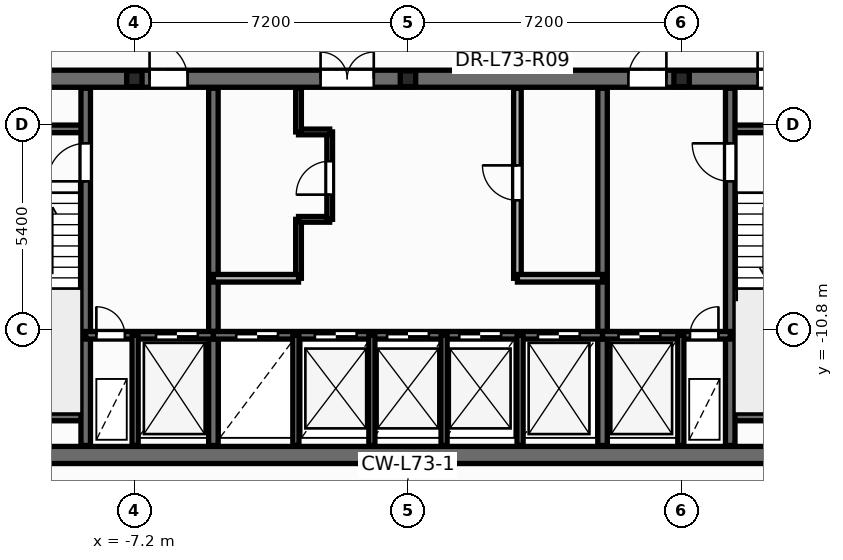
"""IFC4 building model, lengths in metres.
Left out: names, types, materials, properties, quantities, classifications, styles, units other than length and angle.
Written with IfcOpenShell. Run it as: python <this file> out.ifc"""

import sys

from ifc_helpers import new_model, si_unit, direction, frame, frame_2d, origin, origin_2d, place, context, subcontext, project, spatial, rectangle, i_section, extrude, element, fill, save


model = new_model("IFC4")
c1 = context("Model", 3, precision=1e-05, world=origin(), true_north=direction((0.0, 1.0)))
c2 = subcontext(c1, "Body", "Model", "MODEL_VIEW")
j1 = project(units=[si_unit("LENGTHUNIT", "METRE"), si_unit("PLANEANGLEUNIT", "RADIAN")], contexts=[c1])
p1 = place(None, origin())
s1 = spatial("IfcSite", under=j1, at=p1, CompositionType="ELEMENT")
p2 = place(p1, origin())
s2 = spatial("IfcBuilding", under=s1, at=p2, CompositionType="ELEMENT")
p3 = place(p2, frame((0.0, 0.0, 277.8)))
s3 = spatial("IfcBuildingStorey", under=s2, at=p3, CompositionType="ELEMENT", Elevation=277.8)
for number, where, z_axis, x_axis in (
    (1, (-7.2, -4.2, 0.0), (0.0, 0.0, 1.0), (1.0, 0.0, 0.0)),
    (2, (0.0, -4.2, 0.0), (0.0, 0.0, 1.0), (1.0, 0.0, 0.0)),
    (3, (7.2, -4.2, 0.0), (0.0, 0.0, 1.0), (1.0, 0.0, 0.0)),
):
    element("IfcColumn", number, at=place(p3, frame(where, z_axis=z_axis, x_axis=x_axis)), inside=s3, PredefinedType="PILASTER", context=c2, shape_type="SweptSolid", body=[
        extrude(i_section(OverallWidth=0.405, OverallDepth=0.414, WebThickness=0.022, FlangeThickness=0.032, at=origin_2d()), origin(), (0.0, 0.0, 1.0), 3.6),
    ])
p4 = place(p3, frame((-2.88, -9.45, 0.0), z_axis=(0.0, 0.0, 1.0), x_axis=(0.0, 1.0, 0.0)))
e4 = element("IfcWall", 4, at=p4, inside=s3, PredefinedType="PARTITIONING", context=c2, shape_type="SweptSolid", body=[
    extrude(rectangle(XDim=1.55, YDim=0.15, at=frame_2d((0.775, 0.0))), origin(), (0.0, 0.0, 1.0), 3.345),
])
p5 = place(p3, frame((-2.88, -7.9, 0.0), z_axis=(0.0, 0.0, 1.0), x_axis=(1.0, 0.0, 0.0)))
e5 = element("IfcWall", 5, at=p5, inside=s3, PredefinedType="PARTITIONING", context=c2, shape_type="SweptSolid", body=[
    extrude(rectangle(XDim=0.82, YDim=0.15, at=frame_2d((0.41, 0.0))), origin(), (0.0, 0.0, 1.0), 3.345),
])
p6 = place(p3, frame((-2.06, -7.9, 0.0), z_axis=(0.0, 0.0, 1.0), x_axis=(0.0, 1.0, 0.0)))
e6 = element("IfcWall", 6, at=p6, inside=s3, PredefinedType="PARTITIONING", context=c2, shape_type="SweptSolid", body=[
    extrude(rectangle(XDim=2.3, YDim=0.15, at=frame_2d((1.15, 0.0))), origin(), (0.0, 0.0, 1.0), 3.345),
])
p7 = place(p6, frame((0.65, 0.0, 0.0)))
e7 = element("IfcOpeningElement", 7, at=p7, cuts=e6, PredefinedType="OPENING", context=c2, shape_type="SweptSolid", body=[
    extrude(rectangle(XDim=0.886, YDim=2.104, at=frame_2d((0.44, 1.052))), frame((0.0, 0.085, 0.0), z_axis=(0.0, -1.0, 0.0), x_axis=(1.0, 0.0, 0.0)), (0.0, 0.0, 1.0), 0.17),
])
p8 = place(p3, frame((-2.88, -5.6, 0.0), z_axis=(0.0, 0.0, 1.0), x_axis=(1.0, 0.0, 0.0)))
e8 = element("IfcWall", 8, at=p8, inside=s3, PredefinedType="PARTITIONING", context=c2, shape_type="SweptSolid", body=[
    extrude(rectangle(XDim=0.82, YDim=0.15, at=frame_2d((0.41, 0.0))), origin(), (0.0, 0.0, 1.0), 3.345),
])
p9 = place(p3, frame((-2.88, -5.6, 0.0), z_axis=(0.0, 0.0, 1.0), x_axis=(0.0, 1.0, 0.0)))
e9 = element("IfcWall", 9, at=p9, inside=s3, PredefinedType="PARTITIONING", context=c2, shape_type="SweptSolid", body=[
    extrude(rectangle(XDim=1.15, YDim=0.15, at=frame_2d((0.575, 0.0))), origin(), (0.0, 0.0, 1.0), 3.345),
])
p10 = place(p3, frame((-12.65, -14.1, 0.0), z_axis=(0.0, 0.0, 1.0), x_axis=(1.0, 0.0, 0.0)))
e10 = element("IfcWall", 10, at=p10, inside=s3, PredefinedType="SHEAR", context=c2, shape_type="SweptSolid", body=[
    extrude(rectangle(XDim=25.3, YDim=0.45, at=frame_2d((12.65, 0.0))), origin(), (0.0, 0.0, 1.0), 3.6),
])
p11 = place(p3, frame((-12.65, -4.2, 0.0), z_axis=(0.0, 0.0, 1.0), x_axis=(1.0, 0.0, 0.0)))
e11 = element("IfcWall", 11, at=p11, inside=s3, PredefinedType="SHEAR", context=c2, shape_type="SweptSolid", body=[
    extrude(rectangle(XDim=25.3, YDim=0.45, at=frame_2d((12.65, 0.0))), origin(), (0.0, 0.0, 1.0), 3.6),
])
p12 = place(p11, frame((1.85, 0.0, 0.0)))
e12 = element("IfcOpeningElement", 12, at=p12, cuts=e11, PredefinedType="OPENING", context=c2, shape_type="SweptSolid", body=[
    extrude(rectangle(XDim=0.756, YDim=2.054, at=frame_2d((0.375, 1.027))), frame((0.0, 0.235, 0.0), z_axis=(0.0, -1.0, 0.0), x_axis=(1.0, 0.0, 0.0)), (0.0, 0.0, 1.0), 0.47),
])
p13 = place(p11, frame((21.85, 0.0, 0.0)))
e13 = element("IfcOpeningElement", 13, at=p13, cuts=e11, PredefinedType="OPENING", context=c2, shape_type="SweptSolid", body=[
    extrude(rectangle(XDim=0.756, YDim=2.054, at=frame_2d((0.375, 1.027))), frame((0.0, 0.235, 0.0), z_axis=(0.0, -1.0, 0.0), x_axis=(1.0, 0.0, 0.0)), (0.0, 0.0, 1.0), 0.47),
])
p14 = place(p11, frame((23.5, 0.0, 0.0)))
e14 = element("IfcOpeningElement", 14, at=p14, cuts=e11, PredefinedType="OPENING", context=c2, shape_type="SweptSolid", body=[
    extrude(rectangle(XDim=0.756, YDim=2.054, at=frame_2d((0.375, 1.027))), frame((0.0, 0.235, 0.0), z_axis=(0.0, -1.0, 0.0), x_axis=(1.0, 0.0, 0.0)), (0.0, 0.0, 1.0), 0.47),
])
p15 = place(p11, frame((5.85, 0.0, 0.0)))
e15 = element("IfcOpeningElement", 15, at=p15, cuts=e11, PredefinedType="OPENING", context=c2, shape_type="SweptSolid", body=[
    extrude(rectangle(XDim=1.006, YDim=2.104, at=frame_2d((0.5, 1.052))), frame((0.0, 0.235, 0.0), z_axis=(0.0, -1.0, 0.0), x_axis=(1.0, 0.0, 0.0)), (0.0, 0.0, 1.0), 0.47),
])
p16 = place(p11, frame((10.35, 0.0, 0.0)))
e16 = element("IfcOpeningElement", 16, at=p16, cuts=e11, PredefinedType="OPENING", context=c2, shape_type="SweptSolid", body=[
    extrude(rectangle(XDim=1.406, YDim=2.154, at=frame_2d((0.7, 1.077))), frame((0.0, 0.235, 0.0), z_axis=(0.0, -1.0, 0.0), x_axis=(1.0, 0.0, 0.0)), (0.0, 0.0, 1.0), 0.47),
])
p17 = place(p11, frame((18.45, 0.0, 0.0)))
e17 = element("IfcOpeningElement", 17, at=p17, cuts=e11, PredefinedType="OPENING", context=c2, shape_type="SweptSolid", body=[
    extrude(rectangle(XDim=1.006, YDim=2.104, at=frame_2d((0.5, 1.052))), frame((0.0, 0.235, 0.0), z_axis=(0.0, -1.0, 0.0), x_axis=(1.0, 0.0, 0.0)), (0.0, 0.0, 1.0), 0.47),
])
for number, where, z_axis, x_axis in (
    (18, (-12.35, -5.52, 0.0), (0.0, 0.0, 1.0), (1.0, 0.0, 0.0)),
    (19, (-12.35, -13.1, 0.0), (0.0, 0.0, 1.0), (1.0, 0.0, 0.0)),
    (20, (8.48, -5.52, 0.0), (0.0, 0.0, 1.0), (1.0, 0.0, 0.0)),
    (21, (8.48, -13.1, 0.0), (0.0, 0.0, 1.0), (1.0, 0.0, 0.0)),
):
    element("IfcWall", number, at=place(p3, frame(where, z_axis=z_axis, x_axis=x_axis)), inside=s3, PredefinedType="SOLIDWALL", context=c2, shape_type="SweptSolid", body=[
        extrude(rectangle(XDim=3.87, YDim=0.2, at=frame_2d((1.935, 0.0))), origin(), (0.0, 0.0, 1.0), 3.6),
    ])
p18 = place(p3, frame((-8.48, -13.85, 0.0), z_axis=(0.0, 0.0, 1.0), x_axis=(0.0, 1.0, 0.0)))
e22 = element("IfcWall", 22, at=p18, inside=s3, PredefinedType="SHEAR", context=c2, shape_type="SweptSolid", body=[
    extrude(rectangle(XDim=9.4, YDim=0.25, at=frame_2d((4.7, 0.0))), origin(), (0.0, 0.0, 1.0), 3.6),
])
p19 = place(p18, frame((6.95, 0.0, 0.0)))
e23 = element("IfcOpeningElement", 23, at=p19, cuts=e22, PredefinedType="OPENING", context=c2, shape_type="SweptSolid", body=[
    extrude(rectangle(XDim=1.006, YDim=2.104, at=frame_2d((0.5, 1.052))), frame((0.0, 0.135, 0.0), z_axis=(0.0, -1.0, 0.0), x_axis=(1.0, 0.0, 0.0)), (0.0, 0.0, 1.0), 0.27),
])
p20 = place(p3, frame((8.48, -13.85, 0.0), z_axis=(0.0, 0.0, 1.0), x_axis=(0.0, 1.0, 0.0)))
e24 = element("IfcWall", 24, at=p20, inside=s3, PredefinedType="SHEAR", context=c2, shape_type="SweptSolid", body=[
    extrude(rectangle(XDim=9.4, YDim=0.25, at=frame_2d((4.7, 0.0))), origin(), (0.0, 0.0, 1.0), 3.6),
])
p21 = place(p20, frame((6.95, 0.0, 0.0)))
e25 = element("IfcOpeningElement", 25, at=p21, cuts=e24, PredefinedType="OPENING", context=c2, shape_type="SweptSolid", body=[
    extrude(rectangle(XDim=1.006, YDim=2.104, at=frame_2d((0.5, 1.052))), frame((0.0, 0.135, 0.0), z_axis=(0.0, -1.0, 0.0), x_axis=(1.0, 0.0, 0.0)), (0.0, 0.0, 1.0), 0.27),
])
for number, where, z_axis, x_axis in (
    (26, (-5.12, -13.85, 0.0), (0.0, 0.0, 1.0), (0.0, 1.0, 0.0)),
    (27, (5.12, -13.85, 0.0), (0.0, 0.0, 1.0), (0.0, 1.0, 0.0)),
):
    element("IfcWall", number, at=place(p3, frame(where, z_axis=z_axis, x_axis=x_axis)), inside=s3, PredefinedType="SHEAR", context=c2, shape_type="SweptSolid", body=[
        extrude(rectangle(XDim=9.4, YDim=0.25, at=frame_2d((4.7, 0.0))), origin(), (0.0, 0.0, 1.0), 3.6),
    ])
p22 = place(p3, frame((-8.48, -10.95, 0.0), z_axis=(0.0, 0.0, 1.0), x_axis=(1.0, 0.0, 0.0)))
e28 = element("IfcWall", 28, at=p22, inside=s3, PredefinedType="SOLIDWALL", context=c2, shape_type="SweptSolid", body=[
    extrude(rectangle(XDim=3.36, YDim=0.2, at=frame_2d((1.68, 0.0))), origin(), (0.0, 0.0, 1.0), 3.6),
])
p23 = place(p22, frame((0.28, 0.0, 0.0)))
e29 = element("IfcOpeningElement", 29, at=p23, cuts=e28, PredefinedType="OPENING", context=c2, shape_type="SweptSolid", body=[
    extrude(rectangle(XDim=0.756, YDim=2.054, at=frame_2d((0.375, 1.027))), frame((0.0, 0.11, 0.0), z_axis=(0.0, -1.0, 0.0), x_axis=(1.0, 0.0, 0.0)), (0.0, 0.0, 1.0), 0.22),
])
p24 = place(p22, frame((1.85, 0.0, 0.0)))
e30 = element("IfcOpeningElement", 30, at=p24, cuts=e28, PredefinedType="OPENING", context=c2, shape_type="SweptSolid", body=[
    extrude(rectangle(XDim=1.106, YDim=2.104, at=frame_2d((0.55, 1.052))), frame((0.0, 0.11, 0.0), z_axis=(0.0, -1.0, 0.0), x_axis=(1.0, 0.0, 0.0)), (0.0, 0.0, 1.0), 0.22),
])
p25 = place(p3, frame((-5.12, -10.95, 0.0), z_axis=(0.0, 0.0, 1.0), x_axis=(1.0, 0.0, 0.0)))
e31 = element("IfcWall", 31, at=p25, inside=s3, PredefinedType="SOLIDWALL", context=c2, shape_type="SweptSolid", body=[
    extrude(rectangle(XDim=10.24, YDim=0.2, at=frame_2d((5.12, 0.0))), origin(), (0.0, 0.0, 1.0), 3.6),
])
p26 = place(p25, frame((0.6, 0.0, 0.0)))
e32 = element("IfcOpeningElement", 32, at=p26, cuts=e31, PredefinedType="OPENING", context=c2, shape_type="SweptSolid", body=[
    extrude(rectangle(XDim=1.106, YDim=2.104, at=frame_2d((0.55, 1.052))), frame((0.0, 0.11, 0.0), z_axis=(0.0, -1.0, 0.0), x_axis=(1.0, 0.0, 0.0)), (0.0, 0.0, 1.0), 0.22),
])
p27 = place(p25, frame((2.67, 0.0, 0.0)))
e33 = element("IfcOpeningElement", 33, at=p27, cuts=e31, PredefinedType="OPENING", context=c2, shape_type="SweptSolid", body=[
    extrude(rectangle(XDim=1.106, YDim=2.104, at=frame_2d((0.55, 1.052))), frame((0.0, 0.11, 0.0), z_axis=(0.0, -1.0, 0.0), x_axis=(1.0, 0.0, 0.0)), (0.0, 0.0, 1.0), 0.22),
])
p28 = place(p25, frame((4.57, 0.0, 0.0)))
e34 = element("IfcOpeningElement", 34, at=p28, cuts=e31, PredefinedType="OPENING", context=c2, shape_type="SweptSolid", body=[
    extrude(rectangle(XDim=1.106, YDim=2.104, at=frame_2d((0.55, 1.052))), frame((0.0, 0.11, 0.0), z_axis=(0.0, -1.0, 0.0), x_axis=(1.0, 0.0, 0.0)), (0.0, 0.0, 1.0), 0.22),
])
p29 = place(p25, frame((6.47, 0.0, 0.0)))
e35 = element("IfcOpeningElement", 35, at=p29, cuts=e31, PredefinedType="OPENING", context=c2, shape_type="SweptSolid", body=[
    extrude(rectangle(XDim=1.106, YDim=2.104, at=frame_2d((0.55, 1.052))), frame((0.0, 0.11, 0.0), z_axis=(0.0, -1.0, 0.0), x_axis=(1.0, 0.0, 0.0)), (0.0, 0.0, 1.0), 0.22),
])
p30 = place(p25, frame((8.54, 0.0, 0.0)))
e36 = element("IfcOpeningElement", 36, at=p30, cuts=e31, PredefinedType="OPENING", context=c2, shape_type="SweptSolid", body=[
    extrude(rectangle(XDim=1.106, YDim=2.104, at=frame_2d((0.55, 1.052))), frame((0.0, 0.11, 0.0), z_axis=(0.0, -1.0, 0.0), x_axis=(1.0, 0.0, 0.0)), (0.0, 0.0, 1.0), 0.22),
])
p31 = place(p3, frame((5.12, -10.95, 0.0), z_axis=(0.0, 0.0, 1.0), x_axis=(1.0, 0.0, 0.0)))
e37 = element("IfcWall", 37, at=p31, inside=s3, PredefinedType="SOLIDWALL", context=c2, shape_type="SweptSolid", body=[
    extrude(rectangle(XDim=3.36, YDim=0.2, at=frame_2d((1.68, 0.0))), origin(), (0.0, 0.0, 1.0), 3.6),
])
p32 = place(p31, frame((0.42, 0.0, 0.0)))
e38 = element("IfcOpeningElement", 38, at=p32, cuts=e37, PredefinedType="OPENING", context=c2, shape_type="SweptSolid", body=[
    extrude(rectangle(XDim=1.106, YDim=2.104, at=frame_2d((0.55, 1.052))), frame((0.0, 0.11, 0.0), z_axis=(0.0, -1.0, 0.0), x_axis=(1.0, 0.0, 0.0)), (0.0, 0.0, 1.0), 0.22),
])
p33 = place(p31, frame((2.3, 0.0, 0.0)))
e39 = element("IfcOpeningElement", 39, at=p33, cuts=e37, PredefinedType="OPENING", context=c2, shape_type="SweptSolid", body=[
    extrude(rectangle(XDim=0.756, YDim=2.054, at=frame_2d((0.375, 1.027))), frame((0.0, 0.11, 0.0), z_axis=(0.0, -1.0, 0.0), x_axis=(1.0, 0.0, 0.0)), (0.0, 0.0, 1.0), 0.22),
])
for number, where, z_axis, x_axis in (
    (40, (-7.18, -13.85, 0.0), (0.0, 0.0, 1.0), (0.0, 1.0, 0.0)),
    (41, (7.18, -13.85, 0.0), (0.0, 0.0, 1.0), (0.0, 1.0, 0.0)),
    (42, (-2.95, -13.85, 0.0), (0.0, 0.0, 1.0), (0.0, 1.0, 0.0)),
    (43, (2.95, -13.85, 0.0), (0.0, 0.0, 1.0), (0.0, 1.0, 0.0)),
):
    element("IfcWall", number, at=place(p3, frame(where, z_axis=z_axis, x_axis=x_axis)), inside=s3, PredefinedType="PARTITIONING", context=c2, shape_type="SweptSolid", body=[
        extrude(rectangle(XDim=2.9, YDim=0.16, at=frame_2d((1.45, 0.0))), origin(), (0.0, 0.0, 1.0), 2.57),
    ])
p34 = place(p3, frame((-5.12, -9.45, 0.0), z_axis=(0.0, 0.0, 1.0), x_axis=(1.0, 0.0, 0.0)))
e44 = element("IfcWall", 44, at=p34, inside=s3, PredefinedType="SOLIDWALL", context=c2, shape_type="SweptSolid", body=[
    extrude(rectangle(XDim=2.24, YDim=0.2, at=frame_2d((1.12, 0.0))), origin(), (0.0, 0.0, 1.0), 3.345),
])
p35 = place(p3, frame((2.88, -9.45, 0.0), z_axis=(0.0, 0.0, 1.0), x_axis=(0.0, 1.0, 0.0)))
e45 = element("IfcWall", 45, at=p35, inside=s3, PredefinedType="SOLIDWALL", context=c2, shape_type="SweptSolid", body=[
    extrude(rectangle(XDim=5.0, YDim=0.2, at=frame_2d((2.5, 0.0))), origin(), (0.0, 0.0, 1.0), 3.345),
])
p36 = place(p35, frame((2.05, 0.0, 0.0)))
e46 = element("IfcOpeningElement", 46, at=p36, cuts=e45, PredefinedType="OPENING", context=c2, shape_type="SweptSolid", body=[
    extrude(rectangle(XDim=0.926, YDim=2.104, at=frame_2d((0.46, 1.052))), frame((0.0, 0.11, 0.0), z_axis=(0.0, -1.0, 0.0), x_axis=(1.0, 0.0, 0.0)), (0.0, 0.0, 1.0), 0.22),
])
p37 = place(p3, frame((2.88, -9.45, 0.0), z_axis=(0.0, 0.0, 1.0), x_axis=(1.0, 0.0, 0.0)))
e47 = element("IfcWall", 47, at=p37, inside=s3, PredefinedType="SOLIDWALL", context=c2, shape_type="SweptSolid", body=[
    extrude(rectangle(XDim=2.24, YDim=0.2, at=frame_2d((1.12, 0.0))), origin(), (0.0, 0.0, 1.0), 3.345),
])
for number, where, z_axis, x_axis in (
    (48, (-0.95, -13.85, 0.0), (0.0, 0.0, 1.0), (0.0, 1.0, 0.0)),
    (49, (0.95, -13.85, 0.0), (0.0, 0.0, 1.0), (0.0, 1.0, 0.0)),
):
    element("IfcWall", number, at=place(p3, frame(where, z_axis=z_axis, x_axis=x_axis)), inside=s3, PredefinedType="PARTITIONING", context=c2, shape_type="SweptSolid", body=[
        extrude(rectangle(XDim=2.9, YDim=0.16, at=frame_2d((1.45, 0.0))), origin(), (0.0, 0.0, 1.0), 2.57),
    ])
p38 = place(p7, origin())
e50 = element("IfcDoor", 50, at=p38, inside=s3, OperationType="SINGLE_SWING_LEFT", PredefinedType="DOOR", context=c2, shape_type="SweptSolid", body=[
    extrude(rectangle(XDim=0.88, YDim=2.1, at=frame_2d((0.44, 1.05))), frame((0.0, 0.025, 0.0), z_axis=(0.0, -1.0, 0.0), x_axis=(1.0, 0.0, 0.0)), (0.0, 0.0, 1.0), 0.05),
])
fill(e7, e50)
p39 = place(p36, origin())
e51 = element("IfcDoor", 51, at=p39, inside=s3, OperationType="SINGLE_SWING_RIGHT", PredefinedType="DOOR", context=c2, shape_type="SweptSolid", body=[
    extrude(rectangle(XDim=0.92, YDim=2.1, at=frame_2d((0.46, 1.05))), frame((0.0, 0.025, 0.0), z_axis=(0.0, -1.0, 0.0), x_axis=(1.0, 0.0, 0.0)), (0.0, 0.0, 1.0), 0.05),
])
fill(e46, e51)
p40 = place(p19, origin())
e52 = element("IfcDoor", 52, at=p40, inside=s3, OperationType="SINGLE_SWING_LEFT", PredefinedType="DOOR", context=c2, shape_type="SweptSolid", body=[
    extrude(rectangle(XDim=1.0, YDim=2.1, at=frame_2d((0.5, 1.05))), frame((0.0, 0.025, 0.0), z_axis=(0.0, -1.0, 0.0), x_axis=(1.0, 0.0, 0.0)), (0.0, 0.0, 1.0), 0.05),
])
fill(e23, e52)
p41 = place(p21, origin())
e53 = element("IfcDoor", 53, at=p41, inside=s3, OperationType="SINGLE_SWING_RIGHT", PredefinedType="DOOR", context=c2, shape_type="SweptSolid", body=[
    extrude(rectangle(XDim=1.0, YDim=2.1, at=frame_2d((0.5, 1.05))), frame((0.0, 0.025, 0.0), z_axis=(0.0, -1.0, 0.0), x_axis=(1.0, 0.0, 0.0)), (0.0, 0.0, 1.0), 0.05),
])
fill(e25, e53)
p42 = place(p23, origin())
e54 = element("IfcDoor", 54, at=p42, inside=s3, OperationType="SINGLE_SWING_LEFT", PredefinedType="DOOR", context=c2, shape_type="SweptSolid", body=[
    extrude(rectangle(XDim=0.75, YDim=2.05, at=frame_2d((0.375, 1.025))), frame((0.0, 0.025, 0.0), z_axis=(0.0, -1.0, 0.0), x_axis=(1.0, 0.0, 0.0)), (0.0, 0.0, 1.0), 0.05),
])
fill(e29, e54)
p43 = place(p24, origin())
e55 = element("IfcDoor", 55, at=p43, inside=s3, OperationType="DOUBLE_DOOR_SLIDING", PredefinedType="DOOR", context=c2, shape_type="SweptSolid", body=[
    extrude(rectangle(XDim=1.1, YDim=2.1, at=frame_2d((0.55, 1.05))), frame((0.0, 0.025, 0.0), z_axis=(0.0, -1.0, 0.0), x_axis=(1.0, 0.0, 0.0)), (0.0, 0.0, 1.0), 0.05),
])
fill(e30, e55)
p44 = place(p32, origin())
e56 = element("IfcDoor", 56, at=p44, inside=s3, OperationType="DOUBLE_DOOR_SLIDING", PredefinedType="DOOR", context=c2, shape_type="SweptSolid", body=[
    extrude(rectangle(XDim=1.1, YDim=2.1, at=frame_2d((0.55, 1.05))), frame((0.0, 0.025, 0.0), z_axis=(0.0, -1.0, 0.0), x_axis=(1.0, 0.0, 0.0)), (0.0, 0.0, 1.0), 0.05),
])
fill(e38, e56)
p45 = place(p33, origin())
e57 = element("IfcDoor", 57, at=p45, inside=s3, OperationType="SINGLE_SWING_RIGHT", PredefinedType="DOOR", context=c2, shape_type="SweptSolid", body=[
    extrude(rectangle(XDim=0.75, YDim=2.05, at=frame_2d((0.375, 1.025))), frame((0.0, 0.025, 0.0), z_axis=(0.0, -1.0, 0.0), x_axis=(1.0, 0.0, 0.0)), (0.0, 0.0, 1.0), 0.05),
])
fill(e39, e57)
p46 = place(p26, origin())
e58 = element("IfcDoor", 58, at=p46, inside=s3, OperationType="DOUBLE_DOOR_SLIDING", PredefinedType="DOOR", context=c2, shape_type="SweptSolid", body=[
    extrude(rectangle(XDim=1.1, YDim=2.1, at=frame_2d((0.55, 1.05))), frame((0.0, 0.025, 0.0), z_axis=(0.0, -1.0, 0.0), x_axis=(1.0, 0.0, 0.0)), (0.0, 0.0, 1.0), 0.05),
])
fill(e32, e58)
p47 = place(p27, origin())
e59 = element("IfcDoor", 59, at=p47, inside=s3, OperationType="DOUBLE_DOOR_SLIDING", PredefinedType="DOOR", context=c2, shape_type="SweptSolid", body=[
    extrude(rectangle(XDim=1.1, YDim=2.1, at=frame_2d((0.55, 1.05))), frame((0.0, 0.025, 0.0), z_axis=(0.0, -1.0, 0.0), x_axis=(1.0, 0.0, 0.0)), (0.0, 0.0, 1.0), 0.05),
])
fill(e33, e59)
p48 = place(p28, origin())
e60 = element("IfcDoor", 60, at=p48, inside=s3, OperationType="DOUBLE_DOOR_SLIDING", PredefinedType="DOOR", context=c2, shape_type="SweptSolid", body=[
    extrude(rectangle(XDim=1.1, YDim=2.1, at=frame_2d((0.55, 1.05))), frame((0.0, 0.025, 0.0), z_axis=(0.0, -1.0, 0.0), x_axis=(1.0, 0.0, 0.0)), (0.0, 0.0, 1.0), 0.05),
])
fill(e34, e60)
p49 = place(p29, origin())
e61 = element("IfcDoor", 61, at=p49, inside=s3, OperationType="DOUBLE_DOOR_SLIDING", PredefinedType="DOOR", context=c2, shape_type="SweptSolid", body=[
    extrude(rectangle(XDim=1.1, YDim=2.1, at=frame_2d((0.55, 1.05))), frame((0.0, 0.025, 0.0), z_axis=(0.0, -1.0, 0.0), x_axis=(1.0, 0.0, 0.0)), (0.0, 0.0, 1.0), 0.05),
])
fill(e35, e61)
p50 = place(p30, origin())
e62 = element("IfcDoor", 62, at=p50, inside=s3, OperationType="DOUBLE_DOOR_SLIDING", PredefinedType="DOOR", context=c2, shape_type="SweptSolid", body=[
    extrude(rectangle(XDim=1.1, YDim=2.1, at=frame_2d((0.55, 1.05))), frame((0.0, 0.025, 0.0), z_axis=(0.0, -1.0, 0.0), x_axis=(1.0, 0.0, 0.0)), (0.0, 0.0, 1.0), 0.05),
])
fill(e36, e62)
p51 = place(p13, origin())
e63 = element("IfcDoor", 63, at=p51, inside=s3, OperationType="SINGLE_SWING_LEFT", PredefinedType="DOOR", context=c2, shape_type="SweptSolid", body=[
    extrude(rectangle(XDim=0.75, YDim=2.05, at=frame_2d((0.375, 1.025))), frame((0.0, 0.025, 0.0), z_axis=(0.0, -1.0, 0.0), x_axis=(1.0, 0.0, 0.0)), (0.0, 0.0, 1.0), 0.05),
])
fill(e13, e63)
p52 = place(p15, origin())
e64 = element("IfcDoor", 64, at=p52, inside=s3, OperationType="SINGLE_SWING_LEFT", PredefinedType="DOOR", context=c2, shape_type="SweptSolid", body=[
    extrude(rectangle(XDim=1.0, YDim=2.1, at=frame_2d((0.5, 1.05))), frame((0.0, 0.025, 0.0), z_axis=(0.0, -1.0, 0.0), x_axis=(1.0, 0.0, 0.0)), (0.0, 0.0, 1.0), 0.05),
])
fill(e15, e64)
p53 = place(p16, origin())
e65 = element("IfcDoor", 65, at=p53, inside=s3, OperationType="DOUBLE_DOOR_SINGLE_SWING", PredefinedType="DOOR", context=c2, shape_type="SweptSolid", body=[
    extrude(rectangle(XDim=1.4, YDim=2.15, at=frame_2d((0.7, 1.075))), frame((0.0, 0.025, 0.0), z_axis=(0.0, -1.0, 0.0), x_axis=(1.0, 0.0, 0.0)), (0.0, 0.0, 1.0), 0.05),
])
fill(e16, e65)
p54 = place(p17, origin())
e66 = element("IfcDoor", 66, at=p54, inside=s3, OperationType="SINGLE_SWING_RIGHT", PredefinedType="DOOR", context=c2, shape_type="SweptSolid", body=[
    extrude(rectangle(XDim=1.0, YDim=2.1, at=frame_2d((0.5, 1.05))), frame((0.0, 0.025, 0.0), z_axis=(0.0, -1.0, 0.0), x_axis=(1.0, 0.0, 0.0)), (0.0, 0.0, 1.0), 0.05),
])
fill(e17, e66)
save(model, sys.argv[1])
